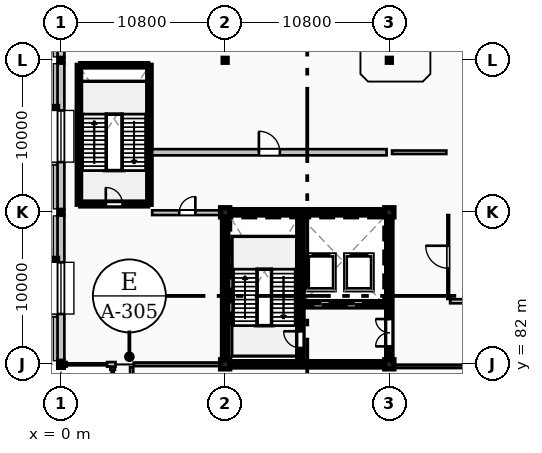
"""IFC4 building model, lengths in metres.
Left out: names, types, materials, properties, quantities, classifications, styles, units other than length and angle.
Written with IfcOpenShell. Run it as: python <this file> out.ifc"""

import sys

from ifc_helpers import new_model, si_unit, direction, frame, frame_2d, origin, origin_2d, place, context, subcontext, project, spatial, rectangle, hollow_rectangle, i_section, extrude, element, fill, save


model = new_model("IFC4")
c1 = context("Model", 3, precision=1e-05, world=origin(), true_north=direction((0.0, 1.0)))
c2 = subcontext(c1, "Body", "Model", "MODEL_VIEW")
j1 = project(units=[si_unit("LENGTHUNIT", "METRE"), si_unit("PLANEANGLEUNIT", "RADIAN")], contexts=[c1])
p1 = place(None, origin())
s1 = spatial("IfcSite", under=j1, at=p1, CompositionType="ELEMENT")
p2 = place(p1, origin())
s2 = spatial("IfcBuilding", under=s1, at=p2, CompositionType="ELEMENT")
p3 = place(p2, frame((0.0, 0.0, 14.4)))
s3 = spatial("IfcBuildingStorey", under=s2, at=p3, CompositionType="ELEMENT", Elevation=14.4)
p4 = place(p3, frame((0.0, 82.0, 0.0), z_axis=(0.0, 0.0, 1.0), x_axis=(1.0, 0.0, 0.0)))
e1 = element("IfcColumn", 1, at=p4, inside=s3, PredefinedType="COLUMN", context=c2, shape_type="SweptSolid", body=[
    extrude(i_section(OverallWidth=0.3, OverallDepth=0.4, WebThickness=0.013, FlangeThickness=0.024, FilletRadius=0.027, at=origin_2d()), origin(), (0.0, 0.0, 1.0), 9.6),
])
for number, where, z_axis, x_axis in (
    (2, (0.0, 92.0, 0.0), (0.0, 0.0, 1.0), (1.0, 0.0, 0.0)),
    (3, (0.0, 102.0, 0.0), (0.0, 0.0, 1.0), (1.0, 0.0, 0.0)),
):
    element("IfcColumn", number, at=place(p3, frame(where, z_axis=z_axis, x_axis=x_axis)), inside=s3, PredefinedType="COLUMN", context=c2, shape_type="SweptSolid", body=[
        extrude(hollow_rectangle(XDim=0.26, YDim=0.26, WallThickness=0.014, InnerFilletRadius=0.014, OuterFilletRadius=0.028, at=origin_2d()), origin(), (0.0, 0.0, 1.0), 9.6),
    ])
for number, where, z_axis, x_axis in (
    (4, (10.8, 82.0, 0.0), (0.0, 0.0, 1.0), (1.0, 0.0, 0.0)),
    (5, (10.8, 92.0, 0.0), (0.0, 0.0, 1.0), (1.0, 0.0, 0.0)),
):
    element("IfcColumn", number, at=place(p3, frame(where, z_axis=z_axis, x_axis=x_axis)), inside=s3, PredefinedType="COLUMN", context=c2, shape_type="SweptSolid", body=[
        extrude(rectangle(XDim=0.6, YDim=0.6, at=origin_2d()), origin(), (0.0, 0.0, 1.0), 9.6),
    ])
p5 = place(p3, frame((10.8, 102.0, 0.0), z_axis=(0.0, 0.0, 1.0), x_axis=(1.0, 0.0, 0.0)))
e6 = element("IfcColumn", 6, at=p5, inside=s3, PredefinedType="COLUMN", context=c2, shape_type="SweptSolid", body=[
    extrude(hollow_rectangle(XDim=0.26, YDim=0.26, WallThickness=0.014, InnerFilletRadius=0.014, OuterFilletRadius=0.028, at=origin_2d()), origin(), (0.0, 0.0, 1.0), 9.6),
])
for number, where, z_axis, x_axis in (
    (7, (21.6, 82.0, 0.0), (0.0, 0.0, 1.0), (1.0, 0.0, 0.0)),
    (8, (21.6, 92.0, 0.0), (0.0, 0.0, 1.0), (1.0, 0.0, 0.0)),
):
    element("IfcColumn", number, at=place(p3, frame(where, z_axis=z_axis, x_axis=x_axis)), inside=s3, PredefinedType="COLUMN", context=c2, shape_type="SweptSolid", body=[
        extrude(rectangle(XDim=0.6, YDim=0.6, at=origin_2d()), origin(), (0.0, 0.0, 1.0), 9.6),
    ])
p6 = place(p3, frame((21.6, 102.0, 0.0), z_axis=(0.0, 0.0, 1.0), x_axis=(1.0, 0.0, 0.0)))
e9 = element("IfcColumn", 9, at=p6, inside=s3, PredefinedType="COLUMN", context=c2, shape_type="SweptSolid", body=[
    extrude(hollow_rectangle(XDim=0.26, YDim=0.26, WallThickness=0.014, InnerFilletRadius=0.014, OuterFilletRadius=0.028, at=origin_2d()), origin(), (0.0, 0.0, 1.0), 9.6),
])
p7 = place(p3, frame((0.0, 111.874, 0.0), z_axis=(0.0, 0.0, 1.0), x_axis=(0.0, -1.0, 0.0)))
e10 = element("IfcWall", 10, at=p7, inside=s3, PredefinedType="STANDARD", context=c2, shape_type="SweptSolid", body=[
    extrude(rectangle(XDim=9.748, YDim=0.45, at=frame_2d((4.874, 0.0))), origin(), (0.0, 0.0, 1.0), 9.36),
])
p8 = place(p7, frame((3.174, 0.0, 1.1)))
e11 = element("IfcOpeningElement", 11, at=p8, cuts=e10, PredefinedType="OPENING", context=c2, shape_type="SweptSolid", body=[
    extrude(rectangle(XDim=3.4, YDim=5.8, at=frame_2d((1.7, 2.9))), frame((0.0, 0.235, 0.0), z_axis=(0.0, -1.0, 0.0), x_axis=(1.0, 0.0, 0.0)), (0.0, 0.0, 1.0), 0.47),
])
p9 = place(p3, frame((0.0, 101.874, 0.0), z_axis=(0.0, 0.0, 1.0), x_axis=(0.0, -1.0, 0.0)))
e12 = element("IfcWall", 12, at=p9, inside=s3, PredefinedType="STANDARD", context=c2, shape_type="SweptSolid", body=[
    extrude(rectangle(XDim=9.748, YDim=0.45, at=frame_2d((4.874, 0.0))), origin(), (0.0, 0.0, 1.0), 9.36),
])
p10 = place(p9, frame((3.174, 0.0, 1.1)))
e13 = element("IfcOpeningElement", 13, at=p10, cuts=e12, PredefinedType="OPENING", context=c2, shape_type="SweptSolid", body=[
    extrude(rectangle(XDim=3.4, YDim=5.8, at=frame_2d((1.7, 2.9))), frame((0.0, 0.235, 0.0), z_axis=(0.0, -1.0, 0.0), x_axis=(1.0, 0.0, 0.0)), (0.0, 0.0, 1.0), 0.47),
])
p11 = place(p3, frame((0.0, 91.874, 0.0), z_axis=(0.0, 0.0, 1.0), x_axis=(0.0, -1.0, 0.0)))
e14 = element("IfcWall", 14, at=p11, inside=s3, PredefinedType="STANDARD", context=c2, shape_type="SweptSolid", body=[
    extrude(rectangle(XDim=9.729, YDim=0.45, at=frame_2d((4.865, 0.0))), origin(), (0.0, 0.0, 1.0), 9.36),
])
p12 = place(p11, frame((3.165, 0.0, 1.1)))
e15 = element("IfcOpeningElement", 15, at=p12, cuts=e14, PredefinedType="OPENING", context=c2, shape_type="SweptSolid", body=[
    extrude(rectangle(XDim=3.4, YDim=5.8, at=frame_2d((1.7, 2.9))), frame((0.0, 0.235, 0.0), z_axis=(0.0, -1.0, 0.0), x_axis=(1.0, 0.0, 0.0)), (0.0, 0.0, 1.0), 0.47),
])
p13 = place(p3, frame((0.145, 82.0, 0.0), z_axis=(0.0, 0.0, 1.0), x_axis=(1.0, 0.0, 0.0)))
e16 = element("IfcWall", 16, at=p13, inside=s3, PredefinedType="STANDARD", context=c2, shape_type="SweptSolid", body=[
    extrude(rectangle(XDim=0.225, YDim=0.3, at=frame_2d((0.113, 0.0))), origin(), (0.0, 0.0, 1.0), 9.36),
])
p14 = place(p3, frame((3.03, 82.0, 0.0), z_axis=(0.0, 0.0, 1.0), x_axis=(1.0, 0.0, 0.0)))
e17 = element("IfcWall", 17, at=p14, inside=s3, PredefinedType="STANDARD", context=c2, shape_type="SweptSolid", body=[
    extrude(rectangle(XDim=0.56, YDim=0.3, at=frame_2d((0.28, 0.0))), origin(), (0.0, 0.0, 1.0), 9.36),
])
p15 = place(p3, frame((3.4, 81.82, 0.0), z_axis=(0.0, 0.0, 1.0), x_axis=(0.0, -1.0, 0.0)))
e18 = element("IfcWall", 18, at=p15, inside=s3, PredefinedType="STANDARD", context=c2, shape_type="SweptSolid", body=[
    extrude(rectangle(XDim=0.19, YDim=0.3, at=frame_2d((0.095, 0.0))), origin(), (0.0, 0.0, 1.0), 9.36),
])
for number, where, z_axis, x_axis in (
    (19, (11.1, 82.0, 0.0), (0.0, 0.0, 1.0), (1.0, 0.0, 0.0)),
    (20, (11.1, 92.0, 0.0), (0.0, 0.0, 1.0), (1.0, 0.0, 0.0)),
):
    element("IfcWall", number, at=place(p3, frame(where, z_axis=z_axis, x_axis=x_axis)), inside=s3, PredefinedType="SHEAR", context=c2, shape_type="SweptSolid", body=[
        extrude(rectangle(XDim=10.2, YDim=0.35, at=frame_2d((5.1, 0.0))), origin(), (0.0, 0.0, 1.0), 9.36),
    ])
p16 = place(p3, frame((10.8, 82.3, 0.0), z_axis=(0.0, 0.0, 1.0), x_axis=(0.0, 1.0, 0.0)))
e21 = element("IfcWall", 21, at=p16, inside=s3, PredefinedType="SHEAR", context=c2, shape_type="SweptSolid", body=[
    extrude(rectangle(XDim=9.4, YDim=0.35, at=frame_2d((4.7, 0.0))), origin(), (0.0, 0.0, 1.0), 9.36),
])
p17 = place(p3, frame((21.6, 82.3, 0.0), z_axis=(0.0, 0.0, 1.0), x_axis=(0.0, 1.0, 0.0)))
e22 = element("IfcWall", 22, at=p17, inside=s3, PredefinedType="SHEAR", context=c2, shape_type="SweptSolid", body=[
    extrude(rectangle(XDim=9.4, YDim=0.35, at=frame_2d((4.7, 0.0))), origin(), (0.0, 0.0, 1.0), 9.36),
])
p18 = place(p17, frame((0.88, 0.0, 0.0)))
e23 = element("IfcOpeningElement", 23, at=p18, cuts=e22, PredefinedType="OPENING", context=c2, shape_type="SweptSolid", body=[
    extrude(rectangle(XDim=1.8, YDim=2.25, at=frame_2d((0.9, 1.125))), frame((0.0, 0.185, 0.0), z_axis=(0.0, -1.0, 0.0), x_axis=(1.0, 0.0, 0.0)), (0.0, 0.0, 1.0), 0.37),
])
p19 = place(p3, frame((15.75, 82.175, 0.0), z_axis=(0.0, 0.0, 1.0), x_axis=(0.0, 1.0, 0.0)))
e24 = element("IfcWall", 24, at=p19, inside=s3, PredefinedType="SHEAR", context=c2, shape_type="SweptSolid", body=[
    extrude(rectangle(XDim=9.65, YDim=0.35, at=frame_2d((4.825, 0.0))), origin(), (0.0, 0.0, 1.0), 9.36),
])
p20 = place(p19, frame((0.9, 0.0, 0.0)))
e25 = element("IfcOpeningElement", 25, at=p20, cuts=e24, PredefinedType="OPENING", context=c2, shape_type="SweptSolid", body=[
    extrude(rectangle(XDim=1.1, YDim=2.2, at=frame_2d((0.55, 1.1))), frame((0.0, 0.185, 0.0), z_axis=(0.0, -1.0, 0.0), x_axis=(1.0, 0.0, 0.0)), (0.0, 0.0, 1.0), 0.37),
])
p21 = place(p3, frame((15.93, 85.95, 0.0), z_axis=(0.0, 0.0, 1.0), x_axis=(1.0, 0.0, 0.0)))
e26 = element("IfcWall", 26, at=p21, inside=s3, PredefinedType="SHEAR", context=c2, shape_type="SweptSolid", body=[
    extrude(rectangle(XDim=5.49, YDim=0.35, at=frame_2d((2.745, 0.0))), origin(), (0.0, 0.0, 1.0), 9.36),
])
p22 = place(p21, frame((0.65, 0.0, 0.0)))
e27 = element("IfcOpeningElement", 27, at=p22, cuts=e26, PredefinedType="OPENING", context=c2, shape_type="SweptSolid", body=[
    extrude(rectangle(XDim=1.1, YDim=2.2, at=frame_2d((0.55, 1.1))), frame((0.0, 0.185, 0.0), z_axis=(0.0, -1.0, 0.0), x_axis=(1.0, 0.0, 0.0)), (0.0, 0.0, 1.0), 0.37),
])
p23 = place(p21, frame((2.85, 0.0, 0.0)))
e28 = element("IfcOpeningElement", 28, at=p23, cuts=e26, PredefinedType="OPENING", context=c2, shape_type="SweptSolid", body=[
    extrude(rectangle(XDim=1.1, YDim=2.2, at=frame_2d((0.55, 1.1))), frame((0.0, 0.185, 0.0), z_axis=(0.0, -1.0, 0.0), x_axis=(1.0, 0.0, 0.0)), (0.0, 0.0, 1.0), 0.37),
])
for number, where, z_axis, x_axis in (
    (29, (1.18, 92.53, 0.0), (0.0, 0.0, 1.0), (0.0, 1.0, 0.0)),
    (30, (5.82, 92.53, 0.0), (0.0, 0.0, 1.0), (0.0, 1.0, 0.0)),
):
    element("IfcWall", number, at=place(p3, frame(where, z_axis=z_axis, x_axis=x_axis)), inside=s3, PredefinedType="SHEAR", context=c2, shape_type="SweptSolid", body=[
        extrude(rectangle(XDim=9.14, YDim=0.22, at=frame_2d((4.57, 0.0))), origin(), (0.0, 0.0, 1.0), 9.36),
    ])
p24 = place(p3, frame((1.3, 101.67, 0.0), z_axis=(0.0, 0.0, 1.0), x_axis=(1.0, 0.0, 0.0)))
e31 = element("IfcWall", 31, at=p24, inside=s3, PredefinedType="SHEAR", context=c2, shape_type="SweptSolid", body=[
    extrude(rectangle(XDim=4.4, YDim=0.22, at=frame_2d((2.2, 0.0))), origin(), (0.0, 0.0, 1.0), 9.36),
])
p25 = place(p3, frame((1.3, 92.53, 0.0), z_axis=(0.0, 0.0, 1.0), x_axis=(1.0, 0.0, 0.0)))
e32 = element("IfcWall", 32, at=p25, inside=s3, PredefinedType="SHEAR", context=c2, shape_type="SweptSolid", body=[
    extrude(rectangle(XDim=4.4, YDim=0.22, at=frame_2d((2.2, 0.0))), origin(), (0.0, 0.0, 1.0), 9.36),
])
p26 = place(p25, frame((1.65, 0.0, 0.0)))
e33 = element("IfcOpeningElement", 33, at=p26, cuts=e32, PredefinedType="OPENING", context=c2, shape_type="SweptSolid", body=[
    extrude(rectangle(XDim=1.1, YDim=2.2, at=frame_2d((0.55, 1.1))), frame((0.0, 0.12, 0.0), z_axis=(0.0, -1.0, 0.0), x_axis=(1.0, 0.0, 0.0)), (0.0, 0.0, 1.0), 0.24),
])
p27 = place(p3, frame((21.78, 81.85, 0.0), z_axis=(0.0, 0.0, 1.0), x_axis=(1.0, 0.0, 0.0)))
e34 = element("IfcWall", 34, at=p27, inside=s3, PredefinedType="PARTITIONING", context=c2, shape_type="SweptSolid", body=[
    extrude(rectangle(XDim=10.42, YDim=0.19, at=frame_2d((5.21, 0.0))), origin(), (0.0, 0.0, 1.0), 8.759),
])
p28 = place(p3, frame((25.6, 86.15, 0.0), z_axis=(0.0, 0.0, 1.0), x_axis=(1.0, 0.0, 0.0)))
e35 = element("IfcWall", 35, at=p28, inside=s3, PredefinedType="PARTITIONING", context=c2, shape_type="SweptSolid", body=[
    extrude(rectangle(XDim=28.22, YDim=0.27, at=frame_2d((14.11, 0.0))), origin(), (0.0, 0.0, 1.0), 9.32),
])
p29 = place(p28, frame((12.76, 0.0, 0.0)))
e36 = element("IfcOpeningElement", 36, at=p29, cuts=e35, PredefinedType="OPENING", context=c2, shape_type="SweptSolid", body=[
    extrude(rectangle(XDim=2.7, YDim=2.85, at=frame_2d((1.35, 1.425))), frame((0.0, 0.145, 0.0), z_axis=(0.0, -1.0, 0.0), x_axis=(1.0, 0.0, 0.0)), (0.0, 0.0, 1.0), 0.29),
])
p30 = place(p3, frame((6.0, 91.975, 0.0), z_axis=(0.0, 0.0, 1.0), x_axis=(1.0, 0.0, 0.0)))
e37 = element("IfcWall", 37, at=p30, inside=s3, PredefinedType="PARTITIONING", context=c2, shape_type="SweptSolid", body=[
    extrude(rectangle(XDim=4.62, YDim=0.31, at=frame_2d((2.31, 0.0))), origin(), (0.0, 0.0, 1.0), 8.92),
])
p31 = place(p30, frame((1.78, 0.0, 0.0)))
e38 = element("IfcOpeningElement", 38, at=p31, cuts=e37, PredefinedType="OPENING", context=c2, shape_type="SweptSolid", body=[
    extrude(rectangle(XDim=1.06, YDim=2.22, at=frame_2d((0.53, 1.11))), frame((0.0, 0.165, 0.0), z_axis=(0.0, -1.0, 0.0), x_axis=(1.0, 0.0, 0.0)), (0.0, 0.0, 1.0), 0.33),
])
p32 = place(p3, frame((6.0, 95.95, 0.0), z_axis=(0.0, 0.0, 1.0), x_axis=(1.0, 0.0, 0.0)))
e39 = element("IfcWall", 39, at=p32, inside=s3, PredefinedType="PARTITIONING", context=c2, shape_type="SweptSolid", body=[
    extrude(rectangle(XDim=15.42, YDim=0.41, at=frame_2d((7.71, 0.0))), origin(), (0.0, 0.0, 1.0), 9.32),
])
p33 = place(p32, frame((7.02, 0.0, 0.0)))
e40 = element("IfcOpeningElement", 40, at=p33, cuts=e39, PredefinedType="OPENING", context=c2, shape_type="SweptSolid", body=[
    extrude(rectangle(XDim=1.38, YDim=2.38, at=frame_2d((0.69, 1.19))), frame((0.0, 0.215, 0.0), z_axis=(0.0, -1.0, 0.0), x_axis=(1.0, 0.0, 0.0)), (0.0, 0.0, 1.0), 0.43),
])
p34 = place(p3, frame((25.475, 86.3, 0.0), z_axis=(0.0, 0.0, 1.0), x_axis=(0.0, 1.0, 0.0)))
e41 = element("IfcWall", 41, at=p34, inside=s3, PredefinedType="PARTITIONING", context=c2, shape_type="SweptSolid", body=[
    extrude(rectangle(XDim=5.52, YDim=0.11, at=frame_2d((2.76, 0.0))), origin(), (0.0, 0.0, 1.0), 9.32),
])
p35 = place(p34, frame((2.02, 0.0, 0.0)))
e42 = element("IfcOpeningElement", 42, at=p35, cuts=e41, PredefinedType="OPENING", context=c2, shape_type="SweptSolid", body=[
    extrude(rectangle(XDim=1.48, YDim=2.42, at=frame_2d((0.74, 1.21))), frame((0.0, 0.065, 0.0), z_axis=(0.0, -1.0, 0.0), x_axis=(1.0, 0.0, 0.0)), (0.0, 0.0, 1.0), 0.13),
])
p36 = place(p3, frame((4.8, 82.0, 0.0), z_axis=(0.0, 0.0, 1.0), x_axis=(1.0, 0.0, 0.0)))
e43 = element("IfcWall", 43, at=p36, inside=s3, PredefinedType="PARTITIONING", context=c2, shape_type="SweptSolid", body=[
    extrude(rectangle(XDim=5.82, YDim=0.21, at=frame_2d((2.91, 0.0))), origin(), (0.0, 0.0, 1.0), 4.054),
])
p37 = place(p3, frame((21.78, 95.95, 0.0), z_axis=(0.0, 0.0, 1.0), x_axis=(1.0, 0.0, 0.0)))
e44 = element("IfcWall", 44, at=p37, inside=s3, PredefinedType="PARTITIONING", context=c2, shape_type="SweptSolid", body=[
    extrude(rectangle(XDim=3.57, YDim=0.23, at=frame_2d((1.785, 0.0))), origin(), (0.0, 0.0, 1.0), 9.32),
])
p38 = place(p3, frame((4.65, 40.18, 0.0), z_axis=(0.0, 0.0, 1.0), x_axis=(0.0, 1.0, 0.0)))
e45 = element("IfcWall", 45, at=p38, inside=s3, PredefinedType="PARTITIONING", context=c2, shape_type="SweptSolid", body=[
    extrude(rectangle(XDim=41.64, YDim=0.21, at=frame_2d((20.82, 0.0))), origin(), (0.0, 0.0, 1.0), 9.32),
])
p39 = place(p3, frame((4.8, 82.0, 4.445), z_axis=(0.0, 0.0, 1.0), x_axis=(1.0, 0.0, 0.0)))
e46 = element("IfcWall", 46, at=p39, inside=s3, PredefinedType="PARTITIONING", context=c2, shape_type="SweptSolid", body=[
    extrude(rectangle(XDim=5.82, YDim=0.21, at=frame_2d((2.91, 0.0))), origin(), (0.0, 0.0, 1.0), 4.314),
])
p40 = place(p10, origin())
e47 = element("IfcWindow", 47, at=p40, inside=s3, PartitioningType="SINGLE_PANEL", PredefinedType="WINDOW", context=c2, shape_type="SweptSolid", body=[
    extrude(rectangle(XDim=3.4, YDim=5.8, at=frame_2d((1.7, 2.9))), frame((0.0, 0.03, 0.0), z_axis=(0.0, -1.0, 0.0), x_axis=(1.0, 0.0, 0.0)), (0.0, 0.0, 1.0), 0.06),
])
fill(e13, e47)
p41 = place(p12, origin())
e48 = element("IfcWindow", 48, at=p41, inside=s3, PartitioningType="SINGLE_PANEL", PredefinedType="WINDOW", context=c2, shape_type="SweptSolid", body=[
    extrude(rectangle(XDim=3.4, YDim=5.8, at=frame_2d((1.7, 2.9))), frame((0.0, 0.03, 0.0), z_axis=(0.0, -1.0, 0.0), x_axis=(1.0, 0.0, 0.0)), (0.0, 0.0, 1.0), 0.06),
])
fill(e15, e48)
p42 = place(p20, origin())
e49 = element("IfcDoor", 49, at=p42, inside=s3, OperationType="SINGLE_SWING_RIGHT", PredefinedType="DOOR", context=c2, shape_type="SweptSolid", body=[
    extrude(rectangle(XDim=1.1, YDim=2.2, at=frame_2d((0.55, 1.1))), frame((0.0, 0.025, 0.0), z_axis=(0.0, -1.0, 0.0), x_axis=(1.0, 0.0, 0.0)), (0.0, 0.0, 1.0), 0.05),
])
fill(e25, e49)
p43 = place(p18, origin())
e50 = element("IfcDoor", 50, at=p43, inside=s3, OperationType="DOUBLE_DOOR_SINGLE_SWING", PredefinedType="DOOR", context=c2, shape_type="SweptSolid", body=[
    extrude(rectangle(XDim=1.8, YDim=2.25, at=frame_2d((0.9, 1.125))), frame((0.0, 0.025, 0.0), z_axis=(0.0, -1.0, 0.0), x_axis=(1.0, 0.0, 0.0)), (0.0, 0.0, 1.0), 0.05),
])
fill(e23, e50)
p44 = place(p22, origin())
e51 = element("IfcDoor", 51, at=p44, inside=s3, OperationType="DOUBLE_DOOR_SLIDING", PredefinedType="DOOR", context=c2, shape_type="SweptSolid", body=[
    extrude(rectangle(XDim=1.1, YDim=2.2, at=frame_2d((0.55, 1.1))), frame((0.0, 0.025, 0.0), z_axis=(0.0, -1.0, 0.0), x_axis=(1.0, 0.0, 0.0)), (0.0, 0.0, 1.0), 0.05),
])
fill(e27, e51)
p45 = place(p23, origin())
e52 = element("IfcDoor", 52, at=p45, inside=s3, OperationType="DOUBLE_DOOR_SLIDING", PredefinedType="DOOR", context=c2, shape_type="SweptSolid", body=[
    extrude(rectangle(XDim=1.1, YDim=2.2, at=frame_2d((0.55, 1.1))), frame((0.0, 0.025, 0.0), z_axis=(0.0, -1.0, 0.0), x_axis=(1.0, 0.0, 0.0)), (0.0, 0.0, 1.0), 0.05),
])
fill(e28, e52)
p46 = place(p26, origin())
e53 = element("IfcDoor", 53, at=p46, inside=s3, OperationType="SINGLE_SWING_LEFT", PredefinedType="DOOR", context=c2, shape_type="SweptSolid", body=[
    extrude(rectangle(XDim=1.1, YDim=2.2, at=frame_2d((0.55, 1.1))), frame((0.0, 0.025, 0.0), z_axis=(0.0, -1.0, 0.0), x_axis=(1.0, 0.0, 0.0)), (0.0, 0.0, 1.0), 0.05),
])
fill(e33, e53)
p47 = place(p31, origin())
e54 = element("IfcDoor", 54, at=p47, inside=s3, OperationType="SINGLE_SWING_RIGHT", PredefinedType="DOOR", context=c2, shape_type="SweptSolid", body=[
    extrude(rectangle(XDim=1.06, YDim=2.22, at=frame_2d((0.53, 1.11))), frame((0.0, 0.025, 0.0), z_axis=(0.0, -1.0, 0.0), x_axis=(1.0, 0.0, 0.0)), (0.0, 0.0, 1.0), 0.05),
])
fill(e38, e54)
p48 = place(p33, origin())
e55 = element("IfcDoor", 55, at=p48, inside=s3, OperationType="SINGLE_SWING_LEFT", PredefinedType="DOOR", context=c2, shape_type="SweptSolid", body=[
    extrude(rectangle(XDim=1.38, YDim=2.38, at=frame_2d((0.69, 1.19))), frame((0.0, 0.025, 0.0), z_axis=(0.0, -1.0, 0.0), x_axis=(1.0, 0.0, 0.0)), (0.0, 0.0, 1.0), 0.05),
])
fill(e40, e55)
p49 = place(p35, origin())
e56 = element("IfcDoor", 56, at=p49, inside=s3, OperationType="SINGLE_SWING_RIGHT", PredefinedType="DOOR", context=c2, shape_type="SweptSolid", body=[
    extrude(rectangle(XDim=1.48, YDim=2.42, at=frame_2d((0.74, 1.21))), frame((0.0, 0.025, 0.0), z_axis=(0.0, -1.0, 0.0), x_axis=(1.0, 0.0, 0.0)), (0.0, 0.0, 1.0), 0.05),
])
fill(e42, e56)
save(model, sys.argv[1])
